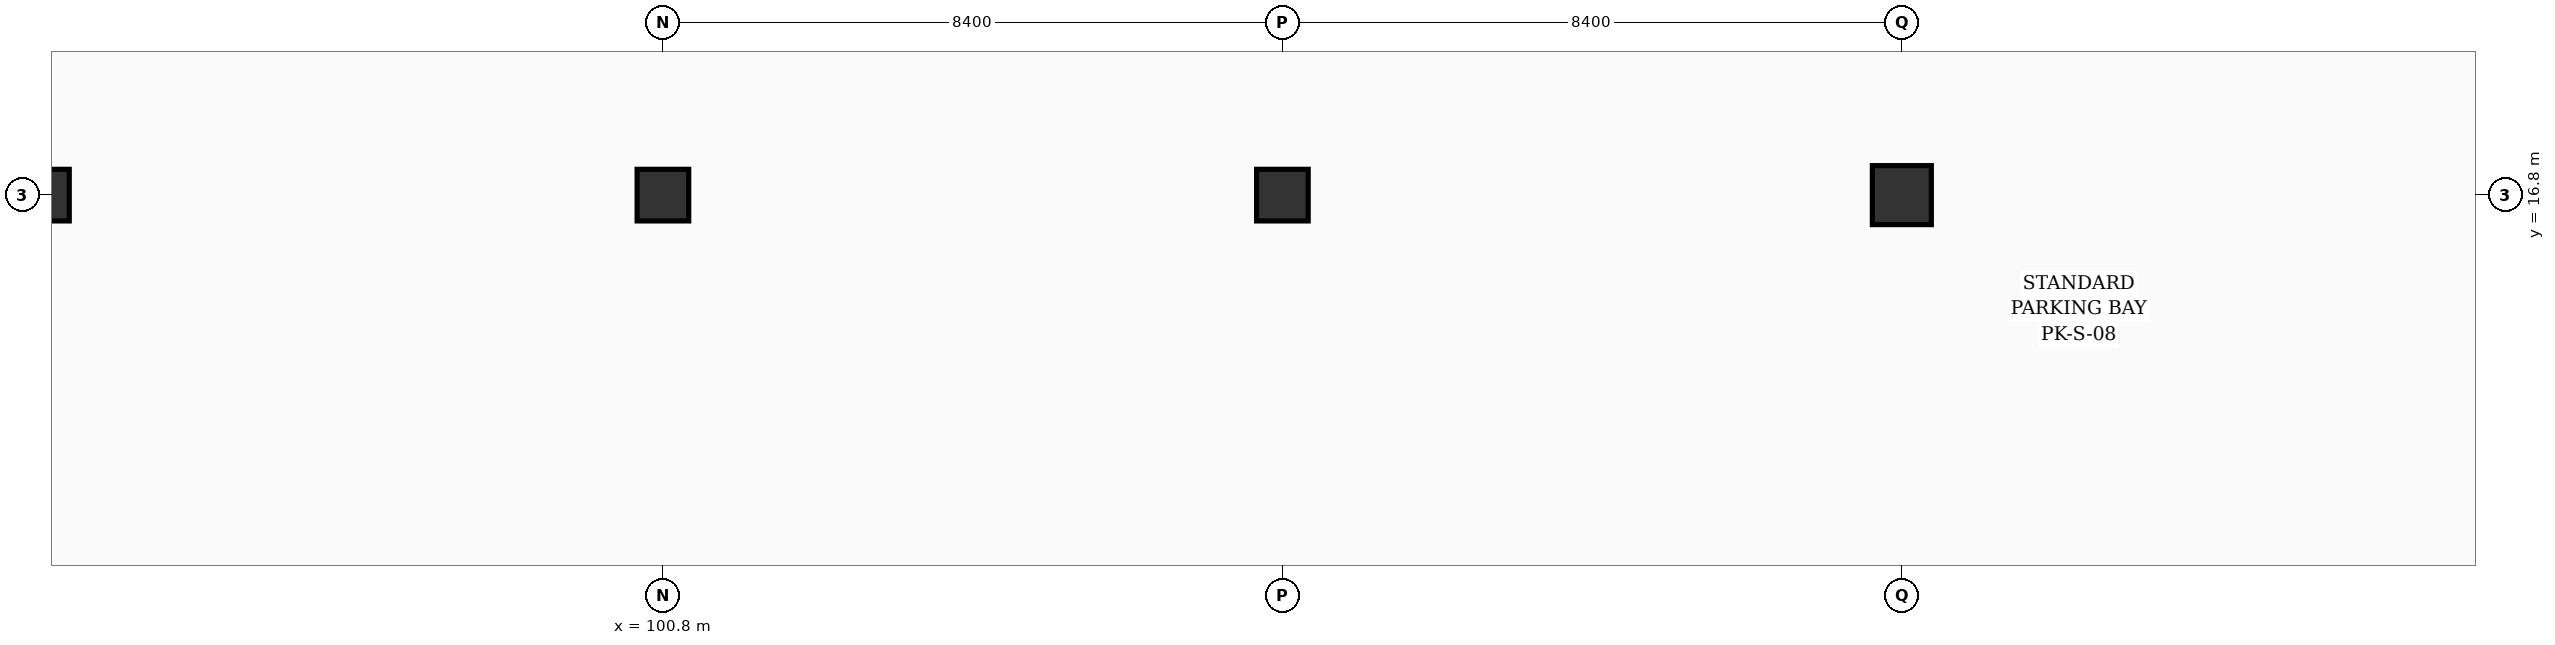
"""IFC4 building model, lengths in metres.
Left out: names, types, materials, properties, quantities, classifications, styles, units other than length and angle.
Written with IfcOpenShell. Run it as: python <this file> out.ifc"""

import sys

from ifc_helpers import new_model, si_unit, direction, frame, origin, origin_2d, place, context, subcontext, project, spatial, rectangle, extrude, element, save


model = new_model("IFC4")
c1 = context("Model", 3, precision=1e-05, world=origin(), true_north=direction((0.0, 1.0)))
c2 = subcontext(c1, "Body", "Model", "MODEL_VIEW")
j1 = project(units=[si_unit("LENGTHUNIT", "METRE"), si_unit("PLANEANGLEUNIT", "RADIAN")], contexts=[c1])
p1 = place(None, origin())
s1 = spatial("IfcSite", under=j1, at=p1, CompositionType="ELEMENT")
p2 = place(p1, origin())
s2 = spatial("IfcBuilding", under=s1, at=p2, CompositionType="ELEMENT")
p3 = place(p2, frame((0.0, 0.0, -4.2)))
s3 = spatial("IfcBuildingStorey", under=s2, at=p3, CompositionType="ELEMENT", Elevation=-4.2)
for number, where, z_axis, x_axis in (
    (1, (92.4, 16.8, 0.0), (0.0, 0.0, 1.0), (1.0, 0.0, 0.0)),
    (2, (100.8, 16.8, 0.0), (0.0, 0.0, 1.0), (1.0, 0.0, 0.0)),
    (3, (109.2, 16.8, 0.0), (0.0, 0.0, 1.0), (1.0, 0.0, 0.0)),
):
    element("IfcColumn", number, at=place(p3, frame(where, z_axis=z_axis, x_axis=x_axis)), inside=s3, PredefinedType="COLUMN", context=c2, shape_type="SweptSolid", body=[
        extrude(rectangle(XDim=0.7, YDim=0.7, at=origin_2d()), origin(), (0.0, 0.0, 1.0), 4.2),
    ])
p4 = place(p3, frame((117.6, 16.8, 0.0), z_axis=(0.0, 0.0, 1.0), x_axis=(1.0, 0.0, 0.0)))
e4 = element("IfcColumn", 4, at=p4, inside=s3, PredefinedType="COLUMN", context=c2, shape_type="SweptSolid", body=[
    extrude(rectangle(XDim=0.8, YDim=0.8, at=origin_2d()), origin(), (0.0, 0.0, 1.0), 4.2),
])
save(model, sys.argv[1])
